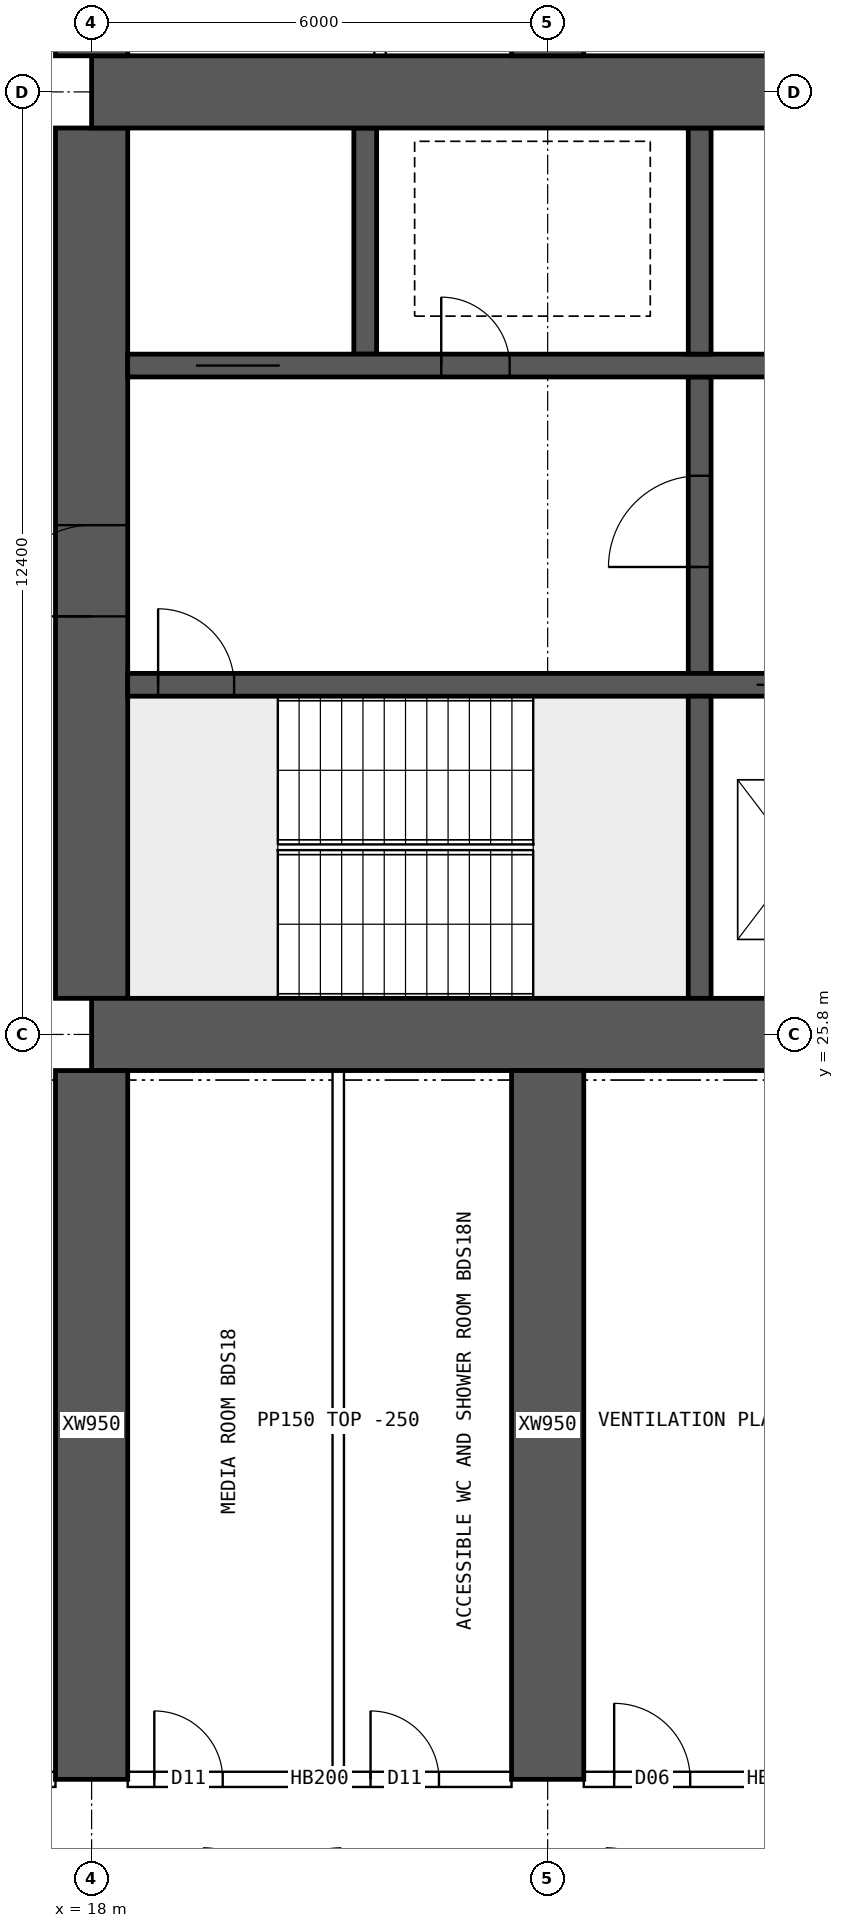
"""IFC4 building model, lengths in metres.
Left out: names, types, materials, properties, quantities, classifications, styles, units other than length and angle.
Written with IfcOpenShell. Run it as: python <this file> out.ifc"""

import sys

from ifc_helpers import new_model, si_unit, direction, frame, frame_2d, origin, place, context, subcontext, project, spatial, rectangle, extrude, element, fill, save


model = new_model("IFC4")
c1 = context("Model", 3, precision=1e-05, world=origin(), true_north=direction((0.0, 1.0)))
c2 = subcontext(c1, "Body", "Model", "MODEL_VIEW")
j1 = project(units=[si_unit("LENGTHUNIT", "METRE"), si_unit("PLANEANGLEUNIT", "RADIAN")], contexts=[c1])
p1 = place(None, origin())
s1 = spatial("IfcSite", under=j1, at=p1, CompositionType="ELEMENT")
p2 = place(p1, origin())
s2 = spatial("IfcBuilding", under=s1, at=p2, CompositionType="ELEMENT")
p3 = place(p2, frame((0.0, 0.0, 76.15)))
s3 = spatial("IfcBuildingStorey", under=s2, at=p3, CompositionType="ELEMENT", Elevation=76.15)
for number, where, z_axis, x_axis in (
    (1, (18.0, 25.8, 0.0), (0.0, 0.0, 1.0), (1.0, 0.0, 0.0)),
    (2, (18.0, 38.2, 0.0), (0.0, 0.0, 1.0), (1.0, 0.0, 0.0)),
):
    element("IfcWall", number, at=place(p3, frame(where, z_axis=z_axis, x_axis=x_axis)), inside=s3, PredefinedType="SHEAR", context=c2, shape_type="SweptSolid", body=[
        extrude(rectangle(XDim=48.0, YDim=0.95, at=frame_2d((24.0, 0.0))), origin(), (0.0, 0.0, 1.0), 4.5),
    ])
p4 = place(p3, frame((18.0, 26.275, 0.0), z_axis=(0.0, 0.0, 1.0), x_axis=(0.0, 1.0, 0.0)))
e3 = element("IfcWall", 3, at=p4, inside=s3, PredefinedType="SHEAR", context=c2, shape_type="SweptSolid", body=[
    extrude(rectangle(XDim=11.45, YDim=0.95, at=frame_2d((5.725, 0.0))), origin(), (0.0, 0.0, 1.0), 4.5),
])
p5 = place(p4, frame((5.025, 0.0, 0.0)))
e4 = element("IfcOpeningElement", 4, at=p5, cuts=e3, PredefinedType="OPENING", context=c2, shape_type="SweptSolid", body=[
    extrude(rectangle(XDim=1.2, YDim=2.1, at=frame_2d((0.6, 1.05))), frame((0.0, 0.485, 0.0), z_axis=(0.0, -1.0, 0.0), x_axis=(1.0, 0.0, 0.0)), (0.0, 0.0, 1.0), 0.97),
])
p6 = place(p3, frame((18.475, 30.4, 0.0), z_axis=(0.0, 0.0, 1.0), x_axis=(1.0, 0.0, 0.0)))
e5 = element("IfcWall", 5, at=p6, inside=s3, PredefinedType="SHEAR", context=c2, shape_type="SweptSolid", body=[
    extrude(rectangle(XDim=47.05, YDim=0.3, at=frame_2d((23.525, 0.0))), origin(), (0.0, 0.0, 1.0), 4.5),
])
p7 = place(p6, frame((0.4, 0.0, 0.0)))
e6 = element("IfcOpeningElement", 6, at=p7, cuts=e5, PredefinedType="OPENING", context=c2, shape_type="SweptSolid", body=[
    extrude(rectangle(XDim=1.0, YDim=2.1, at=frame_2d((0.5, 1.05))), frame((0.0, 0.16, 0.0), z_axis=(0.0, -1.0, 0.0), x_axis=(1.0, 0.0, 0.0)), (0.0, 0.0, 1.0), 0.32),
])
p8 = place(p6, frame((45.65, 0.0, 0.0)))
e7 = element("IfcOpeningElement", 7, at=p8, cuts=e5, PredefinedType="OPENING", context=c2, shape_type="SweptSolid", body=[
    extrude(rectangle(XDim=1.0, YDim=2.1, at=frame_2d((0.5, 1.05))), frame((0.0, 0.16, 0.0), z_axis=(0.0, -1.0, 0.0), x_axis=(1.0, 0.0, 0.0)), (0.0, 0.0, 1.0), 0.32),
])
p9 = place(p6, frame((8.275, 0.0, 0.0)))
e8 = element("IfcOpeningElement", 8, at=p9, cuts=e5, PredefinedType="OPENING", context=c2, shape_type="SweptSolid", body=[
    extrude(rectangle(XDim=1.1, YDim=2.1, at=frame_2d((0.55, 1.05))), frame((0.0, 0.16, 0.0), z_axis=(0.0, -1.0, 0.0), x_axis=(1.0, 0.0, 0.0)), (0.0, 0.0, 1.0), 0.32),
])
p10 = place(p6, frame((10.875, 0.0, 0.0)))
e9 = element("IfcOpeningElement", 9, at=p10, cuts=e5, PredefinedType="OPENING", context=c2, shape_type="SweptSolid", body=[
    extrude(rectangle(XDim=1.1, YDim=2.1, at=frame_2d((0.55, 1.05))), frame((0.0, 0.16, 0.0), z_axis=(0.0, -1.0, 0.0), x_axis=(1.0, 0.0, 0.0)), (0.0, 0.0, 1.0), 0.32),
])
p11 = place(p6, frame((13.475, 0.0, 0.0)))
e10 = element("IfcOpeningElement", 10, at=p11, cuts=e5, PredefinedType="OPENING", context=c2, shape_type="SweptSolid", body=[
    extrude(rectangle(XDim=1.1, YDim=2.1, at=frame_2d((0.55, 1.05))), frame((0.0, 0.16, 0.0), z_axis=(0.0, -1.0, 0.0), x_axis=(1.0, 0.0, 0.0)), (0.0, 0.0, 1.0), 0.32),
])
p12 = place(p6, frame((16.075, 0.0, 0.0)))
e11 = element("IfcOpeningElement", 11, at=p12, cuts=e5, PredefinedType="OPENING", context=c2, shape_type="SweptSolid", body=[
    extrude(rectangle(XDim=1.1, YDim=2.1, at=frame_2d((0.55, 1.05))), frame((0.0, 0.16, 0.0), z_axis=(0.0, -1.0, 0.0), x_axis=(1.0, 0.0, 0.0)), (0.0, 0.0, 1.0), 0.32),
])
p13 = place(p6, frame((18.75, 0.0, 0.0)))
e12 = element("IfcOpeningElement", 12, at=p13, cuts=e5, PredefinedType="OPENING", context=c2, shape_type="SweptSolid", body=[
    extrude(rectangle(XDim=1.1, YDim=2.1, at=frame_2d((0.55, 1.05))), frame((0.0, 0.16, 0.0), z_axis=(0.0, -1.0, 0.0), x_axis=(1.0, 0.0, 0.0)), (0.0, 0.0, 1.0), 0.32),
])
p14 = place(p6, frame((30.142, 0.0, 0.0)))
e13 = element("IfcOpeningElement", 13, at=p14, cuts=e5, PredefinedType="OPENING", context=c2, shape_type="SweptSolid", body=[
    extrude(rectangle(XDim=1.1, YDim=2.1, at=frame_2d((0.55, 1.05))), frame((0.0, 0.16, 0.0), z_axis=(0.0, -1.0, 0.0), x_axis=(1.0, 0.0, 0.0)), (0.0, 0.0, 1.0), 0.32),
])
p15 = place(p6, frame((33.675, 0.0, 0.0)))
e14 = element("IfcOpeningElement", 14, at=p15, cuts=e5, PredefinedType="OPENING", context=c2, shape_type="SweptSolid", body=[
    extrude(rectangle(XDim=1.1, YDim=2.1, at=frame_2d((0.55, 1.05))), frame((0.0, 0.16, 0.0), z_axis=(0.0, -1.0, 0.0), x_axis=(1.0, 0.0, 0.0)), (0.0, 0.0, 1.0), 0.32),
])
p16 = place(p6, frame((37.208, 0.0, 0.0)))
e15 = element("IfcOpeningElement", 15, at=p16, cuts=e5, PredefinedType="OPENING", context=c2, shape_type="SweptSolid", body=[
    extrude(rectangle(XDim=1.1, YDim=2.1, at=frame_2d((0.55, 1.05))), frame((0.0, 0.16, 0.0), z_axis=(0.0, -1.0, 0.0), x_axis=(1.0, 0.0, 0.0)), (0.0, 0.0, 1.0), 0.32),
])
p17 = place(p3, frame((18.475, 34.6, 0.0), z_axis=(0.0, 0.0, 1.0), x_axis=(1.0, 0.0, 0.0)))
e16 = element("IfcWall", 16, at=p17, inside=s3, PredefinedType="SHEAR", context=c2, shape_type="SweptSolid", body=[
    extrude(rectangle(XDim=47.05, YDim=0.3, at=frame_2d((23.525, 0.0))), origin(), (0.0, 0.0, 1.0), 4.5),
])
p18 = place(p17, frame((0.9, 0.0, 0.0)))
e17 = element("IfcOpeningElement", 17, at=p18, cuts=e16, PredefinedType="OPENING", context=c2, shape_type="SweptSolid", body=[
    extrude(rectangle(XDim=1.1, YDim=2.1, at=frame_2d((0.55, 1.05))), frame((0.0, 0.16, 0.0), z_axis=(0.0, -1.0, 0.0), x_axis=(1.0, 0.0, 0.0)), (0.0, 0.0, 1.0), 0.32),
])
p19 = place(p17, frame((45.05, 0.0, 0.0)))
e18 = element("IfcOpeningElement", 18, at=p19, cuts=e16, PredefinedType="OPENING", context=c2, shape_type="SweptSolid", body=[
    extrude(rectangle(XDim=1.1, YDim=2.1, at=frame_2d((0.55, 1.05))), frame((0.0, 0.16, 0.0), z_axis=(0.0, -1.0, 0.0), x_axis=(1.0, 0.0, 0.0)), (0.0, 0.0, 1.0), 0.32),
])
p20 = place(p17, frame((4.125, 0.0, 0.0)))
e19 = element("IfcOpeningElement", 19, at=p20, cuts=e16, PredefinedType="OPENING", context=c2, shape_type="SweptSolid", body=[
    extrude(rectangle(XDim=0.9, YDim=2.1, at=frame_2d((0.45, 1.05))), frame((0.0, 0.16, 0.0), z_axis=(0.0, -1.0, 0.0), x_axis=(1.0, 0.0, 0.0)), (0.0, 0.0, 1.0), 0.32),
])
p21 = place(p17, frame((42.025, 0.0, 0.0)))
e20 = element("IfcOpeningElement", 20, at=p21, cuts=e16, PredefinedType="OPENING", context=c2, shape_type="SweptSolid", body=[
    extrude(rectangle(XDim=0.9, YDim=2.1, at=frame_2d((0.45, 1.05))), frame((0.0, 0.16, 0.0), z_axis=(0.0, -1.0, 0.0), x_axis=(1.0, 0.0, 0.0)), (0.0, 0.0, 1.0), 0.32),
])
p22 = place(p17, frame((8.9, 0.0, 0.0)))
e21 = element("IfcOpeningElement", 21, at=p22, cuts=e16, PredefinedType="OPENING", context=c2, shape_type="SweptSolid", body=[
    extrude(rectangle(XDim=0.9, YDim=2.1, at=frame_2d((0.45, 1.05))), frame((0.0, 0.16, 0.0), z_axis=(0.0, -1.0, 0.0), x_axis=(1.0, 0.0, 0.0)), (0.0, 0.0, 1.0), 0.32),
])
p23 = place(p17, frame((12.874, 0.0, 0.0)))
e22 = element("IfcOpeningElement", 22, at=p23, cuts=e16, PredefinedType="OPENING", context=c2, shape_type="SweptSolid", body=[
    extrude(rectangle(XDim=0.9, YDim=2.1, at=frame_2d((0.45, 1.05))), frame((0.0, 0.16, 0.0), z_axis=(0.0, -1.0, 0.0), x_axis=(1.0, 0.0, 0.0)), (0.0, 0.0, 1.0), 0.32),
])
p24 = place(p17, frame((16.521, 0.0, 0.0)))
e23 = element("IfcOpeningElement", 23, at=p24, cuts=e16, PredefinedType="OPENING", context=c2, shape_type="SweptSolid", body=[
    extrude(rectangle(XDim=0.9, YDim=2.1, at=frame_2d((0.45, 1.05))), frame((0.0, 0.16, 0.0), z_axis=(0.0, -1.0, 0.0), x_axis=(1.0, 0.0, 0.0)), (0.0, 0.0, 1.0), 0.32),
])
p25 = place(p17, frame((20.28, 0.0, 0.0)))
e24 = element("IfcOpeningElement", 24, at=p25, cuts=e16, PredefinedType="OPENING", context=c2, shape_type="SweptSolid", body=[
    extrude(rectangle(XDim=0.9, YDim=2.1, at=frame_2d((0.45, 1.05))), frame((0.0, 0.16, 0.0), z_axis=(0.0, -1.0, 0.0), x_axis=(1.0, 0.0, 0.0)), (0.0, 0.0, 1.0), 0.32),
])
p26 = place(p17, frame((24.686, 0.0, 0.0)))
e25 = element("IfcOpeningElement", 25, at=p26, cuts=e16, PredefinedType="OPENING", context=c2, shape_type="SweptSolid", body=[
    extrude(rectangle(XDim=0.9, YDim=2.1, at=frame_2d((0.45, 1.05))), frame((0.0, 0.16, 0.0), z_axis=(0.0, -1.0, 0.0), x_axis=(1.0, 0.0, 0.0)), (0.0, 0.0, 1.0), 0.32),
])
p27 = place(p17, frame((27.483, 0.0, 0.0)))
e26 = element("IfcOpeningElement", 26, at=p27, cuts=e16, PredefinedType="OPENING", context=c2, shape_type="SweptSolid", body=[
    extrude(rectangle(XDim=0.9, YDim=2.1, at=frame_2d((0.45, 1.05))), frame((0.0, 0.16, 0.0), z_axis=(0.0, -1.0, 0.0), x_axis=(1.0, 0.0, 0.0)), (0.0, 0.0, 1.0), 0.32),
])
p28 = place(p17, frame((29.45, 0.0, 0.0)))
e27 = element("IfcOpeningElement", 27, at=p28, cuts=e16, PredefinedType="OPENING", context=c2, shape_type="SweptSolid", body=[
    extrude(rectangle(XDim=0.9, YDim=2.1, at=frame_2d((0.45, 1.05))), frame((0.0, 0.16, 0.0), z_axis=(0.0, -1.0, 0.0), x_axis=(1.0, 0.0, 0.0)), (0.0, 0.0, 1.0), 0.32),
])
p29 = place(p17, frame((31.882, 0.0, 0.0)))
e28 = element("IfcOpeningElement", 28, at=p29, cuts=e16, PredefinedType="OPENING", context=c2, shape_type="SweptSolid", body=[
    extrude(rectangle(XDim=0.9, YDim=2.1, at=frame_2d((0.45, 1.05))), frame((0.0, 0.16, 0.0), z_axis=(0.0, -1.0, 0.0), x_axis=(1.0, 0.0, 0.0)), (0.0, 0.0, 1.0), 0.32),
])
p30 = place(p17, frame((34.617, 0.0, 0.0)))
e29 = element("IfcOpeningElement", 29, at=p30, cuts=e16, PredefinedType="OPENING", context=c2, shape_type="SweptSolid", body=[
    extrude(rectangle(XDim=0.9, YDim=2.1, at=frame_2d((0.45, 1.05))), frame((0.0, 0.16, 0.0), z_axis=(0.0, -1.0, 0.0), x_axis=(1.0, 0.0, 0.0)), (0.0, 0.0, 1.0), 0.32),
])
p31 = place(p17, frame((37.656, 0.0, 0.0)))
e30 = element("IfcOpeningElement", 30, at=p31, cuts=e16, PredefinedType="OPENING", context=c2, shape_type="SweptSolid", body=[
    extrude(rectangle(XDim=0.9, YDim=2.1, at=frame_2d((0.45, 1.05))), frame((0.0, 0.16, 0.0), z_axis=(0.0, -1.0, 0.0), x_axis=(1.0, 0.0, 0.0)), (0.0, 0.0, 1.0), 0.32),
])
p32 = place(p3, frame((26.0, 26.275, 0.0), z_axis=(0.0, 0.0, 1.0), x_axis=(0.0, 1.0, 0.0)))
e31 = element("IfcWall", 31, at=p32, inside=s3, PredefinedType="SHEAR", context=c2, shape_type="SweptSolid", body=[
    extrude(rectangle(XDim=3.975, YDim=0.3, at=frame_2d((1.988, 0.0))), origin(), (0.0, 0.0, 1.0), 4.5),
])
p33 = place(p3, frame((26.0, 30.55, 0.0), z_axis=(0.0, 0.0, 1.0), x_axis=(0.0, 1.0, 0.0)))
e32 = element("IfcWall", 32, at=p33, inside=s3, PredefinedType="SHEAR", context=c2, shape_type="SweptSolid", body=[
    extrude(rectangle(XDim=3.9, YDim=0.3, at=frame_2d((1.95, 0.0))), origin(), (0.0, 0.0, 1.0), 4.5),
])
p34 = place(p33, frame((1.4, 0.0, 0.0)))
e33 = element("IfcOpeningElement", 33, at=p34, cuts=e32, PredefinedType="OPENING", context=c2, shape_type="SweptSolid", body=[
    extrude(rectangle(XDim=1.2, YDim=2.1, at=frame_2d((0.6, 1.05))), frame((0.0, 0.16, 0.0), z_axis=(0.0, -1.0, 0.0), x_axis=(1.0, 0.0, 0.0)), (0.0, 0.0, 1.0), 0.32),
])
for number, where, z_axis, x_axis in (
    (34, (21.6, 34.75, 0.0), (0.0, 0.0, 1.0), (0.0, 1.0, 0.0)),
    (35, (26.0, 34.75, 0.0), (0.0, 0.0, 1.0), (0.0, 1.0, 0.0)),
):
    element("IfcWall", number, at=place(p3, frame(where, z_axis=z_axis, x_axis=x_axis)), inside=s3, PredefinedType="SHEAR", context=c2, shape_type="SweptSolid", body=[
        extrude(rectangle(XDim=2.975, YDim=0.3, at=frame_2d((1.488, 0.0))), origin(), (0.0, 0.0, 1.0), 4.5),
    ])
for number, where, z_axis, x_axis in (
    (36, (18.0, 16.0, 0.0), (0.0, 0.0, 1.0), (0.0, 1.0, 0.0)),
    (37, (18.0, 38.675, 0.0), (0.0, 0.0, 1.0), (0.0, 1.0, 0.0)),
    (38, (24.0, 16.0, 0.0), (0.0, 0.0, 1.0), (0.0, 1.0, 0.0)),
    (39, (24.0, 38.675, 0.0), (0.0, 0.0, 1.0), (0.0, 1.0, 0.0)),
):
    element("IfcWall", number, at=place(p3, frame(where, z_axis=z_axis, x_axis=x_axis)), inside=s3, PredefinedType="SHEAR", context=c2, shape_type="SweptSolid", body=[
        extrude(rectangle(XDim=9.325, YDim=0.95, at=frame_2d((4.663, 0.0))), origin(), (0.0, 0.0, 1.0), 4.5),
    ])
p35 = place(p3, frame((12.475, 16.0, 0.0), z_axis=(0.0, 0.0, 1.0), x_axis=(1.0, 0.0, 0.0)))
e40 = element("IfcWall", 40, at=p35, inside=s3, PredefinedType="SOLIDWALL", context=c2, shape_type="SweptSolid", body=[
    extrude(rectangle(XDim=5.05, YDim=0.2, at=frame_2d((2.525, 0.0))), origin(), (0.0, 0.0, 1.0), 4.25),
])
p36 = place(p35, frame((3.325, 0.0, 0.0)))
e41 = element("IfcOpeningElement", 41, at=p36, cuts=e40, PredefinedType="OPENING", context=c2, shape_type="SweptSolid", body=[
    extrude(rectangle(XDim=1.6, YDim=2.1, at=frame_2d((0.8, 1.05))), frame((0.0, 0.11, 0.0), z_axis=(0.0, -1.0, 0.0), x_axis=(1.0, 0.0, 0.0)), (0.0, 0.0, 1.0), 0.22),
])
p37 = place(p3, frame((18.475, 16.0, 0.0), z_axis=(0.0, 0.0, 1.0), x_axis=(1.0, 0.0, 0.0)))
e42 = element("IfcWall", 42, at=p37, inside=s3, PredefinedType="SOLIDWALL", context=c2, shape_type="SweptSolid", body=[
    extrude(rectangle(XDim=5.05, YDim=0.2, at=frame_2d((2.525, 0.0))), origin(), (0.0, 0.0, 1.0), 4.25),
])
p38 = place(p37, frame((0.35, 0.0, 0.0)))
e43 = element("IfcOpeningElement", 43, at=p38, cuts=e42, PredefinedType="OPENING", context=c2, shape_type="SweptSolid", body=[
    extrude(rectangle(XDim=0.9, YDim=2.1, at=frame_2d((0.45, 1.05))), frame((0.0, 0.11, 0.0), z_axis=(0.0, -1.0, 0.0), x_axis=(1.0, 0.0, 0.0)), (0.0, 0.0, 1.0), 0.22),
])
p39 = place(p37, frame((3.195, 0.0, 0.0)))
e44 = element("IfcOpeningElement", 44, at=p39, cuts=e42, PredefinedType="OPENING", context=c2, shape_type="SweptSolid", body=[
    extrude(rectangle(XDim=0.9, YDim=2.1, at=frame_2d((0.45, 1.05))), frame((0.0, 0.11, 0.0), z_axis=(0.0, -1.0, 0.0), x_axis=(1.0, 0.0, 0.0)), (0.0, 0.0, 1.0), 0.22),
])
p40 = place(p3, frame((24.475, 16.0, 0.0), z_axis=(0.0, 0.0, 1.0), x_axis=(1.0, 0.0, 0.0)))
e45 = element("IfcWall", 45, at=p40, inside=s3, PredefinedType="SOLIDWALL", context=c2, shape_type="SweptSolid", body=[
    extrude(rectangle(XDim=5.05, YDim=0.2, at=frame_2d((2.525, 0.0))), origin(), (0.0, 0.0, 1.0), 4.25),
])
p41 = place(p40, frame((0.4, 0.0, 0.0)))
e46 = element("IfcOpeningElement", 46, at=p41, cuts=e45, PredefinedType="OPENING", context=c2, shape_type="SweptSolid", body=[
    extrude(rectangle(XDim=1.0, YDim=2.1, at=frame_2d((0.5, 1.05))), frame((0.0, 0.11, 0.0), z_axis=(0.0, -1.0, 0.0), x_axis=(1.0, 0.0, 0.0)), (0.0, 0.0, 1.0), 0.22),
])
for number, where, z_axis, x_axis in (
    (47, (21.245, 16.1, 0.0), (0.0, 0.0, 1.0), (0.0, 1.0, 0.0)),
    (48, (21.795, 38.675, 0.0), (0.0, 0.0, 1.0), (0.0, 1.0, 0.0)),
):
    element("IfcWall", number, at=place(p3, frame(where, z_axis=z_axis, x_axis=x_axis)), inside=s3, PredefinedType="PARTITIONING", context=c2, shape_type="SweptSolid", body=[
        extrude(rectangle(XDim=9.225, YDim=0.15, at=frame_2d((4.612, 0.0))), origin(), (0.0, 0.0, 1.0), 4.25),
    ])
p42 = place(p5, origin())
e49 = element("IfcDoor", 49, at=p42, inside=s3, OperationType="SINGLE_SWING_LEFT", PredefinedType="DOOR", context=c2, shape_type="SweptSolid", body=[
    extrude(rectangle(XDim=1.2, YDim=2.1, at=frame_2d((0.6, 1.05))), frame((0.0, 0.025, 0.0), z_axis=(0.0, -1.0, 0.0), x_axis=(1.0, 0.0, 0.0)), (0.0, 0.0, 1.0), 0.05),
])
fill(e4, e49)
p43 = place(p7, origin())
e50 = element("IfcDoor", 50, at=p43, inside=s3, OperationType="SINGLE_SWING_LEFT", PredefinedType="DOOR", context=c2, shape_type="SweptSolid", body=[
    extrude(rectangle(XDim=1.0, YDim=2.1, at=frame_2d((0.5, 1.05))), frame((0.0, 0.025, 0.0), z_axis=(0.0, -1.0, 0.0), x_axis=(1.0, 0.0, 0.0)), (0.0, 0.0, 1.0), 0.05),
])
fill(e6, e50)
p44 = place(p18, origin())
e51 = element("IfcDoor", 51, at=p44, inside=s3, OperationType="DOUBLE_DOOR_SLIDING", PredefinedType="DOOR", context=c2, shape_type="SweptSolid", body=[
    extrude(rectangle(XDim=1.1, YDim=2.1, at=frame_2d((0.55, 1.05))), frame((0.0, 0.025, 0.0), z_axis=(0.0, -1.0, 0.0), x_axis=(1.0, 0.0, 0.0)), (0.0, 0.0, 1.0), 0.05),
])
fill(e17, e51)
p45 = place(p20, origin())
e52 = element("IfcDoor", 52, at=p45, inside=s3, OperationType="SINGLE_SWING_LEFT", PredefinedType="DOOR", context=c2, shape_type="SweptSolid", body=[
    extrude(rectangle(XDim=0.9, YDim=2.1, at=frame_2d((0.45, 1.05))), frame((0.0, 0.025, 0.0), z_axis=(0.0, -1.0, 0.0), x_axis=(1.0, 0.0, 0.0)), (0.0, 0.0, 1.0), 0.05),
])
fill(e19, e52)
p46 = place(p34, origin())
e53 = element("IfcDoor", 53, at=p46, inside=s3, OperationType="SINGLE_SWING_LEFT", PredefinedType="DOOR", context=c2, shape_type="SweptSolid", body=[
    extrude(rectangle(XDim=1.2, YDim=2.1, at=frame_2d((0.6, 1.05))), frame((0.0, 0.025, 0.0), z_axis=(0.0, -1.0, 0.0), x_axis=(1.0, 0.0, 0.0)), (0.0, 0.0, 1.0), 0.05),
])
fill(e33, e53)
p47 = place(p9, origin())
e54 = element("IfcDoor", 54, at=p47, inside=s3, OperationType="DOUBLE_DOOR_SLIDING", PredefinedType="DOOR", context=c2, shape_type="SweptSolid", body=[
    extrude(rectangle(XDim=1.1, YDim=2.1, at=frame_2d((0.55, 1.05))), frame((0.0, 0.025, 0.0), z_axis=(0.0, -1.0, 0.0), x_axis=(1.0, 0.0, 0.0)), (0.0, 0.0, 1.0), 0.05),
])
fill(e8, e54)
p48 = place(p38, origin())
e55 = element("IfcDoor", 55, at=p48, inside=s3, OperationType="SINGLE_SWING_LEFT", PredefinedType="DOOR", context=c2, shape_type="SweptSolid", body=[
    extrude(rectangle(XDim=0.9, YDim=2.1, at=frame_2d((0.45, 1.05))), frame((0.0, 0.025, 0.0), z_axis=(0.0, -1.0, 0.0), x_axis=(1.0, 0.0, 0.0)), (0.0, 0.0, 1.0), 0.05),
])
fill(e43, e55)
p49 = place(p39, origin())
e56 = element("IfcDoor", 56, at=p49, inside=s3, OperationType="SINGLE_SWING_LEFT", PredefinedType="DOOR", context=c2, shape_type="SweptSolid", body=[
    extrude(rectangle(XDim=0.9, YDim=2.1, at=frame_2d((0.45, 1.05))), frame((0.0, 0.025, 0.0), z_axis=(0.0, -1.0, 0.0), x_axis=(1.0, 0.0, 0.0)), (0.0, 0.0, 1.0), 0.05),
])
fill(e44, e56)
p50 = place(p41, origin())
e57 = element("IfcDoor", 57, at=p50, inside=s3, OperationType="SINGLE_SWING_LEFT", PredefinedType="DOOR", context=c2, shape_type="SweptSolid", body=[
    extrude(rectangle(XDim=1.0, YDim=2.1, at=frame_2d((0.5, 1.05))), frame((0.0, 0.025, 0.0), z_axis=(0.0, -1.0, 0.0), x_axis=(1.0, 0.0, 0.0)), (0.0, 0.0, 1.0), 0.05),
])
fill(e46, e57)
save(model, sys.argv[1])
